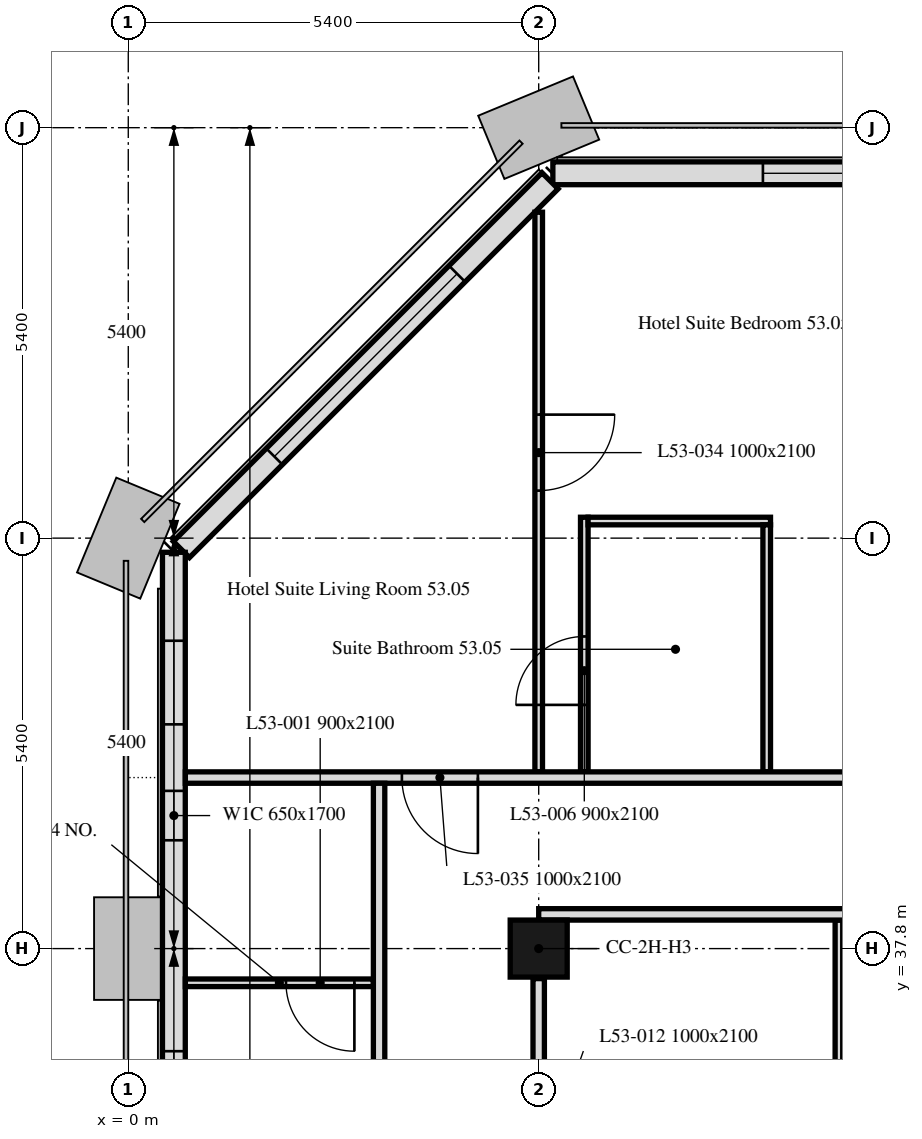
"""IFC4 building model, lengths in metres.
Left out: names, types, materials, properties, quantities, classifications, styles, units other than length and angle.
Written with IfcOpenShell. Run it as: python <this file> out.ifc"""

import sys

from ifc_helpers import new_model, si_unit, direction, frame, frame_2d, origin, origin_2d, place, context, subcontext, project, spatial, rectangle, extrude, element, fill, save


model = new_model("IFC4")
c1 = context("Model", 3, precision=1e-05, world=origin(), true_north=direction((0.0, 1.0)))
c2 = subcontext(c1, "Body", "Model", "MODEL_VIEW")
j1 = project(units=[si_unit("LENGTHUNIT", "METRE"), si_unit("PLANEANGLEUNIT", "RADIAN")], contexts=[c1])
p1 = place(None, origin())
s1 = spatial("IfcSite", under=j1, at=p1, CompositionType="ELEMENT")
p2 = place(p1, origin())
s2 = spatial("IfcBuilding", under=s1, at=p2, CompositionType="ELEMENT")
p3 = place(p2, frame((0.0, 0.0, 213.7)))
s3 = spatial("IfcBuildingStorey", under=s2, at=p3, CompositionType="ELEMENT", Elevation=213.7)
p4 = place(p3, frame((5.4, 37.8, 0.0), z_axis=(0.0, 0.0, 1.0), x_axis=(1.0, 0.0, 0.0)))
e1 = element("IfcColumn", 1, at=p4, inside=s3, PredefinedType="COLUMN", context=c2, shape_type="SweptSolid", body=[
    extrude(rectangle(XDim=0.75, YDim=0.75, at=origin_2d()), origin(), (0.0, 0.0, 1.0), 3.0),
])
p5 = place(p3, frame((37.614, 48.0, 0.0), z_axis=(0.0, 0.0, 1.0), x_axis=(-1.0, 0.0, 0.0)))
e2 = element("IfcWall", 2, at=p5, inside=s3, PredefinedType="SOLIDWALL", context=c2, shape_type="SweptSolid", body=[
    extrude(rectangle(XDim=32.027, YDim=0.3, at=frame_2d((16.014, 0.0))), origin(), (0.0, 0.0, 1.0), 3.0),
])
p6 = place(p5, frame((0.814, 0.0, 0.9)))
e3 = element("IfcOpeningElement", 3, at=p6, cuts=e2, PredefinedType="OPENING", context=c2, shape_type="SweptSolid", body=[
    extrude(rectangle(XDim=3.4, YDim=1.7, at=frame_2d((1.7, 0.85))), frame((0.0, 0.16, 0.0), z_axis=(0.0, -1.0, 0.0), x_axis=(1.0, 0.0, 0.0)), (0.0, 0.0, 1.0), 0.32),
])
p7 = place(p5, frame((6.564, 0.0, 0.9)))
e4 = element("IfcOpeningElement", 4, at=p7, cuts=e2, PredefinedType="OPENING", context=c2, shape_type="SweptSolid", body=[
    extrude(rectangle(XDim=1.1, YDim=1.7, at=frame_2d((0.55, 0.85))), frame((0.0, 0.16, 0.0), z_axis=(0.0, -1.0, 0.0), x_axis=(1.0, 0.0, 0.0)), (0.0, 0.0, 1.0), 0.32),
])
p8 = place(p5, frame((11.614, 0.0, 0.9)))
e5 = element("IfcOpeningElement", 5, at=p8, cuts=e2, PredefinedType="OPENING", context=c2, shape_type="SweptSolid", body=[
    extrude(rectangle(XDim=3.4, YDim=1.7, at=frame_2d((1.7, 0.85))), frame((0.0, 0.16, 0.0), z_axis=(0.0, -1.0, 0.0), x_axis=(1.0, 0.0, 0.0)), (0.0, 0.0, 1.0), 0.32),
])
p9 = place(p5, frame((17.364, 0.0, 0.9)))
e6 = element("IfcOpeningElement", 6, at=p9, cuts=e2, PredefinedType="OPENING", context=c2, shape_type="SweptSolid", body=[
    extrude(rectangle(XDim=1.1, YDim=1.7, at=frame_2d((0.55, 0.85))), frame((0.0, 0.16, 0.0), z_axis=(0.0, -1.0, 0.0), x_axis=(1.0, 0.0, 0.0)), (0.0, 0.0, 1.0), 0.32),
])
p10 = place(p5, frame((22.414, 0.0, 0.9)))
e7 = element("IfcOpeningElement", 7, at=p10, cuts=e2, PredefinedType="OPENING", context=c2, shape_type="SweptSolid", body=[
    extrude(rectangle(XDim=3.4, YDim=1.7, at=frame_2d((1.7, 0.85))), frame((0.0, 0.16, 0.0), z_axis=(0.0, -1.0, 0.0), x_axis=(1.0, 0.0, 0.0)), (0.0, 0.0, 1.0), 0.32),
])
p11 = place(p5, frame((28.164, 0.0, 0.9)))
e8 = element("IfcOpeningElement", 8, at=p11, cuts=e2, PredefinedType="OPENING", context=c2, shape_type="SweptSolid", body=[
    extrude(rectangle(XDim=1.1, YDim=1.7, at=frame_2d((0.55, 0.85))), frame((0.0, 0.16, 0.0), z_axis=(0.0, -1.0, 0.0), x_axis=(1.0, 0.0, 0.0)), (0.0, 0.0, 1.0), 0.32),
])
p12 = place(p3, frame((5.55, 47.901, 0.0), z_axis=(0.0, 0.0, 1.0), x_axis=(-0.707106781187, -0.707106781187, 0.0)))
e9 = element("IfcWall", 9, at=p12, inside=s3, PredefinedType="SOLIDWALL", context=c2, shape_type="SweptSolid", body=[
    extrude(rectangle(XDim=6.86, YDim=0.3, at=frame_2d((3.43, 0.0))), origin(), (0.0, 0.0, 1.0), 3.0),
])
p13 = place(p12, frame((1.73, 0.0, 0.9)))
e10 = element("IfcOpeningElement", 10, at=p13, cuts=e9, PredefinedType="OPENING", context=c2, shape_type="SweptSolid", body=[
    extrude(rectangle(XDim=3.4, YDim=1.7, at=frame_2d((1.7, 0.85))), frame((0.0, 0.16, 0.0), z_axis=(0.0, -1.0, 0.0), x_axis=(1.0, 0.0, 0.0)), (0.0, 0.0, 1.0), 0.32),
])
p14 = place(p3, frame((0.6, 43.014, 0.0), z_axis=(0.0, 0.0, 1.0), x_axis=(0.0, -1.0, 0.0)))
e11 = element("IfcWall", 11, at=p14, inside=s3, PredefinedType="SOLIDWALL", context=c2, shape_type="SweptSolid", body=[
    extrude(rectangle(XDim=32.027, YDim=0.3, at=frame_2d((16.014, 0.0))), origin(), (0.0, 0.0, 1.0), 3.0),
])
p15 = place(p14, frame((1.164, 0.0, 0.9)))
e12 = element("IfcOpeningElement", 12, at=p15, cuts=e11, PredefinedType="OPENING", context=c2, shape_type="SweptSolid", body=[
    extrude(rectangle(XDim=1.1, YDim=1.7, at=frame_2d((0.55, 0.85))), frame((0.0, 0.16, 0.0), z_axis=(0.0, -1.0, 0.0), x_axis=(1.0, 0.0, 0.0)), (0.0, 0.0, 1.0), 0.32),
])
p16 = place(p14, frame((3.139, 0.0, 0.9)))
e13 = element("IfcOpeningElement", 13, at=p16, cuts=e11, PredefinedType="OPENING", context=c2, shape_type="SweptSolid", body=[
    extrude(rectangle(XDim=0.65, YDim=1.7, at=frame_2d((0.325, 0.85))), frame((0.0, 0.16, 0.0), z_axis=(0.0, -1.0, 0.0), x_axis=(1.0, 0.0, 0.0)), (0.0, 0.0, 1.0), 0.32),
])
p17 = place(p14, frame((6.564, 0.0, 0.9)))
e14 = element("IfcOpeningElement", 14, at=p17, cuts=e11, PredefinedType="OPENING", context=c2, shape_type="SweptSolid", body=[
    extrude(rectangle(XDim=1.1, YDim=1.7, at=frame_2d((0.55, 0.85))), frame((0.0, 0.16, 0.0), z_axis=(0.0, -1.0, 0.0), x_axis=(1.0, 0.0, 0.0)), (0.0, 0.0, 1.0), 0.32),
])
p18 = place(p14, frame((8.164, 0.0, 0.9)))
e15 = element("IfcOpeningElement", 15, at=p18, cuts=e11, PredefinedType="OPENING", context=c2, shape_type="SweptSolid", body=[
    extrude(rectangle(XDim=1.1, YDim=1.7, at=frame_2d((0.55, 0.85))), frame((0.0, 0.16, 0.0), z_axis=(0.0, -1.0, 0.0), x_axis=(1.0, 0.0, 0.0)), (0.0, 0.0, 1.0), 0.32),
])
p19 = place(p14, frame((11.614, 0.0, 0.9)))
e16 = element("IfcOpeningElement", 16, at=p19, cuts=e11, PredefinedType="OPENING", context=c2, shape_type="SweptSolid", body=[
    extrude(rectangle(XDim=3.4, YDim=1.7, at=frame_2d((1.7, 0.85))), frame((0.0, 0.16, 0.0), z_axis=(0.0, -1.0, 0.0), x_axis=(1.0, 0.0, 0.0)), (0.0, 0.0, 1.0), 0.32),
])
p20 = place(p14, frame((17.364, 0.0, 0.9)))
e17 = element("IfcOpeningElement", 17, at=p20, cuts=e11, PredefinedType="OPENING", context=c2, shape_type="SweptSolid", body=[
    extrude(rectangle(XDim=1.1, YDim=1.7, at=frame_2d((0.55, 0.85))), frame((0.0, 0.16, 0.0), z_axis=(0.0, -1.0, 0.0), x_axis=(1.0, 0.0, 0.0)), (0.0, 0.0, 1.0), 0.32),
])
p21 = place(p14, frame((18.964, 0.0, 0.9)))
e18 = element("IfcOpeningElement", 18, at=p21, cuts=e11, PredefinedType="OPENING", context=c2, shape_type="SweptSolid", body=[
    extrude(rectangle(XDim=1.1, YDim=1.7, at=frame_2d((0.55, 0.85))), frame((0.0, 0.16, 0.0), z_axis=(0.0, -1.0, 0.0), x_axis=(1.0, 0.0, 0.0)), (0.0, 0.0, 1.0), 0.32),
])
p22 = place(p14, frame((22.414, 0.0, 0.9)))
e19 = element("IfcOpeningElement", 19, at=p22, cuts=e11, PredefinedType="OPENING", context=c2, shape_type="SweptSolid", body=[
    extrude(rectangle(XDim=3.4, YDim=1.7, at=frame_2d((1.7, 0.85))), frame((0.0, 0.16, 0.0), z_axis=(0.0, -1.0, 0.0), x_axis=(1.0, 0.0, 0.0)), (0.0, 0.0, 1.0), 0.32),
])
p23 = place(p14, frame((28.164, 0.0, 0.9)))
e20 = element("IfcOpeningElement", 20, at=p23, cuts=e11, PredefinedType="OPENING", context=c2, shape_type="SweptSolid", body=[
    extrude(rectangle(XDim=1.1, YDim=1.7, at=frame_2d((0.55, 0.85))), frame((0.0, 0.16, 0.0), z_axis=(0.0, -1.0, 0.0), x_axis=(1.0, 0.0, 0.0)), (0.0, 0.0, 1.0), 0.32),
])
p24 = place(p14, frame((29.764, 0.0, 0.9)))
e21 = element("IfcOpeningElement", 21, at=p24, cuts=e11, PredefinedType="OPENING", context=c2, shape_type="SweptSolid", body=[
    extrude(rectangle(XDim=1.1, YDim=1.7, at=frame_2d((0.55, 0.85))), frame((0.0, 0.16, 0.0), z_axis=(0.0, -1.0, 0.0), x_axis=(1.0, 0.0, 0.0)), (0.0, 0.0, 1.0), 0.32),
])
p25 = place(p3, frame((3.225, 37.35, 0.0), z_axis=(0.0, 0.0, 1.0), x_axis=(-1.0, 0.0, 0.0)))
e22 = element("IfcWall", 22, at=p25, inside=s3, PredefinedType="PARTITIONING", context=c2, shape_type="SweptSolid", body=[
    extrude(rectangle(XDim=2.474, YDim=0.1, at=frame_2d((1.237, 0.0))), origin(), (0.0, 0.0, 1.0), 3.0),
])
p26 = place(p25, frame((0.25, 0.0, 0.0)))
e23 = element("IfcOpeningElement", 23, at=p26, cuts=e22, PredefinedType="OPENING", context=c2, shape_type="SweptSolid", body=[
    extrude(rectangle(XDim=0.9, YDim=2.1, at=frame_2d((0.45, 1.05))), frame((0.0, 0.05, 0.0), z_axis=(0.0, -1.0, 0.0), x_axis=(1.0, 0.0, 0.0)), (0.0, 0.0, 1.0), 0.1),
])
p27 = place(p3, frame((5.4, 47.488, 0.0), z_axis=(0.0, 0.0, 1.0), x_axis=(0.0, -1.0, 0.0)))
e24 = element("IfcWall", 24, at=p27, inside=s3, PredefinedType="PARTITIONING", context=c2, shape_type="SweptSolid", body=[
    extrude(rectangle(XDim=7.363, YDim=0.1, at=frame_2d((3.681, 0.0))), origin(), (0.0, 0.0, 1.0), 3.0),
])
p28 = place(p27, frame((2.663, 0.0, 0.0)))
e25 = element("IfcOpeningElement", 25, at=p28, cuts=e24, PredefinedType="OPENING", context=c2, shape_type="SweptSolid", body=[
    extrude(rectangle(XDim=1.0, YDim=2.1, at=frame_2d((0.5, 1.05))), frame((0.0, 0.05, 0.0), z_axis=(0.0, -1.0, 0.0), x_axis=(1.0, 0.0, 0.0)), (0.0, 0.0, 1.0), 0.1),
])
p29 = place(p3, frame((6.0, 40.125, 0.0), z_axis=(0.0, 0.0, 1.0), x_axis=(0.0, 1.0, 0.0)))
e26 = element("IfcWall", 26, at=p29, inside=s3, PredefinedType="PARTITIONING", context=c2, shape_type="SweptSolid", body=[
    extrude(rectangle(XDim=3.35, YDim=0.1, at=frame_2d((1.675, 0.0))), origin(), (0.0, 0.0, 1.0), 3.0),
])
p30 = place(p29, frame((0.881, 0.0, 0.0)))
e27 = element("IfcOpeningElement", 27, at=p30, cuts=e26, PredefinedType="OPENING", context=c2, shape_type="SweptSolid", body=[
    extrude(rectangle(XDim=0.9, YDim=2.1, at=frame_2d((0.45, 1.05))), frame((0.0, 0.05, 0.0), z_axis=(0.0, -1.0, 0.0), x_axis=(1.0, 0.0, 0.0)), (0.0, 0.0, 1.0), 0.1),
])
p31 = place(p3, frame((6.05, 43.425, 0.0), z_axis=(0.0, 0.0, 1.0), x_axis=(1.0, 0.0, 0.0)))
e28 = element("IfcWall", 28, at=p31, inside=s3, PredefinedType="PARTITIONING", context=c2, shape_type="SweptSolid", body=[
    extrude(rectangle(XDim=2.4, YDim=0.1, at=frame_2d((1.2, 0.0))), origin(), (0.0, 0.0, 1.0), 3.0),
])
p32 = place(p3, frame((8.4, 43.375, 0.0), z_axis=(0.0, 0.0, 1.0), x_axis=(0.0, -1.0, 0.0)))
e29 = element("IfcWall", 29, at=p32, inside=s3, PredefinedType="PARTITIONING", context=c2, shape_type="SweptSolid", body=[
    extrude(rectangle(XDim=3.25, YDim=0.1, at=frame_2d((1.625, 0.0))), origin(), (0.0, 0.0, 1.0), 3.0),
])
p33 = place(p3, frame((42.449, 40.05, 0.0), z_axis=(0.0, 0.0, 1.0), x_axis=(-1.0, 0.0, 0.0)))
e30 = element("IfcWall", 30, at=p33, inside=s3, PredefinedType="PARTITIONING", context=c2, shape_type="SweptSolid", body=[
    extrude(rectangle(XDim=41.698, YDim=0.15, at=frame_2d((20.849, 0.0))), origin(), (0.0, 0.0, 1.0), 2.4),
])
p34 = place(p33, frame((2.249, 0.0, 0.0)))
e31 = element("IfcOpeningElement", 31, at=p34, cuts=e30, PredefinedType="OPENING", context=c2, shape_type="SweptSolid", body=[
    extrude(rectangle(XDim=1.0, YDim=2.1, at=frame_2d((0.5, 1.05))), frame((0.0, 0.075, 0.0), z_axis=(0.0, -1.0, 0.0), x_axis=(1.0, 0.0, 0.0)), (0.0, 0.0, 1.0), 0.15),
])
p35 = place(p33, frame((6.849, 0.0, 0.0)))
e32 = element("IfcOpeningElement", 32, at=p35, cuts=e30, PredefinedType="OPENING", context=c2, shape_type="SweptSolid", body=[
    extrude(rectangle(XDim=1.0, YDim=2.1, at=frame_2d((0.5, 1.05))), frame((0.0, 0.075, 0.0), z_axis=(0.0, -1.0, 0.0), x_axis=(1.0, 0.0, 0.0)), (0.0, 0.0, 1.0), 0.15),
])
p36 = place(p33, frame((18.449, 0.0, 0.0)))
e33 = element("IfcOpeningElement", 33, at=p36, cuts=e30, PredefinedType="OPENING", context=c2, shape_type="SweptSolid", body=[
    extrude(rectangle(XDim=1.0, YDim=2.1, at=frame_2d((0.5, 1.05))), frame((0.0, 0.075, 0.0), z_axis=(0.0, -1.0, 0.0), x_axis=(1.0, 0.0, 0.0)), (0.0, 0.0, 1.0), 0.15),
])
p37 = place(p33, frame((23.049, 0.0, 0.0)))
e34 = element("IfcOpeningElement", 34, at=p37, cuts=e30, PredefinedType="OPENING", context=c2, shape_type="SweptSolid", body=[
    extrude(rectangle(XDim=1.0, YDim=2.1, at=frame_2d((0.5, 1.05))), frame((0.0, 0.075, 0.0), z_axis=(0.0, -1.0, 0.0), x_axis=(1.0, 0.0, 0.0)), (0.0, 0.0, 1.0), 0.15),
])
p38 = place(p33, frame((37.849, 0.0, 0.0)))
e35 = element("IfcOpeningElement", 35, at=p38, cuts=e30, PredefinedType="OPENING", context=c2, shape_type="SweptSolid", body=[
    extrude(rectangle(XDim=1.0, YDim=2.1, at=frame_2d((0.5, 1.05))), frame((0.0, 0.075, 0.0), z_axis=(0.0, -1.0, 0.0), x_axis=(1.0, 0.0, 0.0)), (0.0, 0.0, 1.0), 0.15),
])
p39 = place(p3, frame((9.35, 38.175, 0.0), z_axis=(0.0, 0.0, 1.0), x_axis=(0.0, -1.0, 0.0)))
e36 = element("IfcWall", 36, at=p39, inside=s3, PredefinedType="PARTITIONING", context=c2, shape_type="SweptSolid", body=[
    extrude(rectangle(XDim=5.775, YDim=0.1, at=frame_2d((2.888, 0.0))), origin(), (0.0, 0.0, 1.0), 2.4),
])
p40 = place(p3, frame((5.4, 32.4, 0.0), z_axis=(0.0, 0.0, 1.0), x_axis=(0.0, 1.0, 0.0)))
e37 = element("IfcWall", 37, at=p40, inside=s3, PredefinedType="PARTITIONING", context=c2, shape_type="SweptSolid", body=[
    extrude(rectangle(XDim=5.005, YDim=0.15, at=frame_2d((2.502, 0.0))), origin(), (0.0, 0.0, 1.0), 3.0),
])
p41 = place(p40, frame((1.894, 0.0, 0.0)))
e38 = element("IfcOpeningElement", 38, at=p41, cuts=e37, PredefinedType="OPENING", context=c2, shape_type="SweptSolid", body=[
    extrude(rectangle(XDim=1.0, YDim=2.1, at=frame_2d((0.5, 1.05))), frame((0.0, 0.075, 0.0), z_axis=(0.0, -1.0, 0.0), x_axis=(1.0, 0.0, 0.0)), (0.0, 0.0, 1.0), 0.15),
])
p42 = place(p3, frame((42.449, 38.25, 0.0), z_axis=(0.0, 0.0, 1.0), x_axis=(-1.0, 0.0, 0.0)))
e39 = element("IfcWall", 39, at=p42, inside=s3, PredefinedType="PARTITIONING", context=c2, shape_type="SweptSolid", body=[
    extrude(rectangle(XDim=37.049, YDim=0.15, at=frame_2d((18.524, 0.0))), origin(), (0.0, 0.0, 1.0), 2.4),
])
p43 = place(p42, frame((12.266, 0.0, 0.0)))
e40 = element("IfcOpeningElement", 40, at=p43, cuts=e39, PredefinedType="OPENING", context=c2, shape_type="SweptSolid", body=[
    extrude(rectangle(XDim=1.0, YDim=2.1, at=frame_2d((0.5, 1.05))), frame((0.0, 0.075, 0.0), z_axis=(0.0, -1.0, 0.0), x_axis=(1.0, 0.0, 0.0)), (0.0, 0.0, 1.0), 0.15),
])
p44 = place(p42, frame((23.049, 0.0, 0.0)))
e41 = element("IfcOpeningElement", 41, at=p44, cuts=e39, PredefinedType="OPENING", context=c2, shape_type="SweptSolid", body=[
    extrude(rectangle(XDim=1.0, YDim=2.1, at=frame_2d((0.5, 1.05))), frame((0.0, 0.075, 0.0), z_axis=(0.0, -1.0, 0.0), x_axis=(1.0, 0.0, 0.0)), (0.0, 0.0, 1.0), 0.15),
])
p45 = place(p42, frame((1.409, 0.0, 0.0)))
e42 = element("IfcOpeningElement", 42, at=p45, cuts=e39, PredefinedType="OPENING", context=c2, shape_type="SweptSolid", body=[
    extrude(rectangle(XDim=1.0, YDim=2.1, at=frame_2d((0.5, 1.05))), frame((0.0, 0.075, 0.0), z_axis=(0.0, -1.0, 0.0), x_axis=(1.0, 0.0, 0.0)), (0.0, 0.0, 1.0), 0.15),
])
p46 = place(p42, frame((28.199, 0.0, 0.0)))
e43 = element("IfcOpeningElement", 43, at=p46, cuts=e39, PredefinedType="OPENING", context=c2, shape_type="SweptSolid", body=[
    extrude(rectangle(XDim=1.0, YDim=2.1, at=frame_2d((0.5, 1.05))), frame((0.0, 0.075, 0.0), z_axis=(0.0, -1.0, 0.0), x_axis=(1.0, 0.0, 0.0)), (0.0, 0.0, 1.0), 0.15),
])
p47 = place(p42, frame((7.099, 0.0, 0.0)))
e44 = element("IfcOpeningElement", 44, at=p47, cuts=e39, PredefinedType="OPENING", context=c2, shape_type="SweptSolid", body=[
    extrude(rectangle(XDim=1.0, YDim=2.1, at=frame_2d((0.5, 1.05))), frame((0.0, 0.075, 0.0), z_axis=(0.0, -1.0, 0.0), x_axis=(1.0, 0.0, 0.0)), (0.0, 0.0, 1.0), 0.15),
])
p48 = place(p42, frame((5.629, 0.0, 0.0)))
e45 = element("IfcOpeningElement", 45, at=p48, cuts=e39, PredefinedType="OPENING", context=c2, shape_type="SweptSolid", body=[
    extrude(rectangle(XDim=1.0, YDim=2.1, at=frame_2d((0.5, 1.05))), frame((0.0, 0.075, 0.0), z_axis=(0.0, -1.0, 0.0), x_axis=(1.0, 0.0, 0.0)), (0.0, 0.0, 1.0), 0.15),
])
p49 = place(p42, frame((29.669, 0.0, 0.0)))
e46 = element("IfcOpeningElement", 46, at=p49, cuts=e39, PredefinedType="OPENING", context=c2, shape_type="SweptSolid", body=[
    extrude(rectangle(XDim=1.0, YDim=2.1, at=frame_2d((0.5, 1.05))), frame((0.0, 0.075, 0.0), z_axis=(0.0, -1.0, 0.0), x_axis=(1.0, 0.0, 0.0)), (0.0, 0.0, 1.0), 0.15),
])
p50 = place(p3, frame((3.3, 11.775, 0.0), z_axis=(0.0, 0.0, 1.0), x_axis=(0.0, 1.0, 0.0)))
e47 = element("IfcWall", 47, at=p50, inside=s3, PredefinedType="PARTITIONING", context=c2, shape_type="SweptSolid", body=[
    extrude(rectangle(XDim=28.2, YDim=0.15, at=frame_2d((14.1, 0.0))), origin(), (0.0, 0.0, 1.0), 2.4),
])
p51 = place(p50, frame((17.425, 0.0, 0.0)))
e48 = element("IfcOpeningElement", 48, at=p51, cuts=e47, PredefinedType="OPENING", context=c2, shape_type="SweptSolid", body=[
    extrude(rectangle(XDim=1.0, YDim=2.1, at=frame_2d((0.5, 1.05))), frame((0.0, 0.075, 0.0), z_axis=(0.0, -1.0, 0.0), x_axis=(1.0, 0.0, 0.0)), (0.0, 0.0, 1.0), 0.15),
])
p52 = place(p50, frame((1.675, 0.0, 0.0)))
e49 = element("IfcOpeningElement", 49, at=p52, cuts=e47, PredefinedType="OPENING", context=c2, shape_type="SweptSolid", body=[
    extrude(rectangle(XDim=1.0, YDim=2.1, at=frame_2d((0.5, 1.05))), frame((0.0, 0.075, 0.0), z_axis=(0.0, -1.0, 0.0), x_axis=(1.0, 0.0, 0.0)), (0.0, 0.0, 1.0), 0.15),
])
p53 = place(p50, frame((22.6, 0.0, 0.0)))
e50 = element("IfcOpeningElement", 50, at=p53, cuts=e47, PredefinedType="OPENING", context=c2, shape_type="SweptSolid", body=[
    extrude(rectangle(XDim=1.0, YDim=2.1, at=frame_2d((0.5, 1.05))), frame((0.0, 0.075, 0.0), z_axis=(0.0, -1.0, 0.0), x_axis=(1.0, 0.0, 0.0)), (0.0, 0.0, 1.0), 0.15),
])
p54 = place(p50, frame((7.975, 0.0, 0.0)))
e51 = element("IfcOpeningElement", 51, at=p54, cuts=e47, PredefinedType="OPENING", context=c2, shape_type="SweptSolid", body=[
    extrude(rectangle(XDim=1.0, YDim=2.1, at=frame_2d((0.5, 1.05))), frame((0.0, 0.075, 0.0), z_axis=(0.0, -1.0, 0.0), x_axis=(1.0, 0.0, 0.0)), (0.0, 0.0, 1.0), 0.15),
])
p55 = place(p11, origin())
e52 = element("IfcWindow", 52, at=p55, inside=s3, PartitioningType="SINGLE_PANEL", PredefinedType="WINDOW", context=c2, shape_type="SweptSolid", body=[
    extrude(rectangle(XDim=1.1, YDim=1.7, at=frame_2d((0.55, 0.85))), frame((0.0, 0.03, 0.0), z_axis=(0.0, -1.0, 0.0), x_axis=(1.0, 0.0, 0.0)), (0.0, 0.0, 1.0), 0.06),
])
fill(e8, e52)
p56 = place(p13, origin())
e53 = element("IfcWindow", 53, at=p56, inside=s3, PartitioningType="SINGLE_PANEL", PredefinedType="WINDOW", context=c2, shape_type="SweptSolid", body=[
    extrude(rectangle(XDim=3.4, YDim=1.7, at=frame_2d((1.7, 0.85))), frame((0.0, 0.03, 0.0), z_axis=(0.0, -1.0, 0.0), x_axis=(1.0, 0.0, 0.0)), (0.0, 0.0, 1.0), 0.06),
])
fill(e10, e53)
p57 = place(p15, origin())
e54 = element("IfcWindow", 54, at=p57, inside=s3, PartitioningType="SINGLE_PANEL", PredefinedType="WINDOW", context=c2, shape_type="SweptSolid", body=[
    extrude(rectangle(XDim=1.1, YDim=1.7, at=frame_2d((0.55, 0.85))), frame((0.0, 0.03, 0.0), z_axis=(0.0, -1.0, 0.0), x_axis=(1.0, 0.0, 0.0)), (0.0, 0.0, 1.0), 0.06),
])
fill(e12, e54)
p58 = place(p16, origin())
e55 = element("IfcWindow", 55, at=p58, inside=s3, PartitioningType="SINGLE_PANEL", PredefinedType="WINDOW", context=c2, shape_type="SweptSolid", body=[
    extrude(rectangle(XDim=0.65, YDim=1.7, at=frame_2d((0.325, 0.85))), frame((0.0, 0.03, 0.0), z_axis=(0.0, -1.0, 0.0), x_axis=(1.0, 0.0, 0.0)), (0.0, 0.0, 1.0), 0.06),
])
fill(e13, e55)
p59 = place(p17, origin())
e56 = element("IfcWindow", 56, at=p59, inside=s3, PartitioningType="SINGLE_PANEL", PredefinedType="WINDOW", context=c2, shape_type="SweptSolid", body=[
    extrude(rectangle(XDim=1.1, YDim=1.7, at=frame_2d((0.55, 0.85))), frame((0.0, 0.03, 0.0), z_axis=(0.0, -1.0, 0.0), x_axis=(1.0, 0.0, 0.0)), (0.0, 0.0, 1.0), 0.06),
])
fill(e14, e56)
p60 = place(p26, origin())
e57 = element("IfcDoor", 57, at=p60, inside=s3, OperationType="SINGLE_SWING_RIGHT", PredefinedType="DOOR", context=c2, shape_type="SweptSolid", body=[
    extrude(rectangle(XDim=0.9, YDim=2.1, at=frame_2d((0.45, 1.05))), frame((0.0, 0.025, 0.0), z_axis=(0.0, -1.0, 0.0), x_axis=(1.0, 0.0, 0.0)), (0.0, 0.0, 1.0), 0.05),
])
fill(e23, e57)
p61 = place(p30, origin())
e58 = element("IfcDoor", 58, at=p61, inside=s3, OperationType="SINGLE_SWING_RIGHT", PredefinedType="DOOR", context=c2, shape_type="SweptSolid", body=[
    extrude(rectangle(XDim=0.9, YDim=2.1, at=frame_2d((0.45, 1.05))), frame((0.0, 0.025, 0.0), z_axis=(0.0, -1.0, 0.0), x_axis=(1.0, 0.0, 0.0)), (0.0, 0.0, 1.0), 0.05),
])
fill(e27, e58)
p62 = place(p28, origin())
e59 = element("IfcDoor", 59, at=p62, inside=s3, OperationType="SINGLE_SWING_RIGHT", PredefinedType="DOOR", context=c2, shape_type="SweptSolid", body=[
    extrude(rectangle(XDim=1.0, YDim=2.1, at=frame_2d((0.5, 1.05))), frame((0.0, 0.025, 0.0), z_axis=(0.0, -1.0, 0.0), x_axis=(1.0, 0.0, 0.0)), (0.0, 0.0, 1.0), 0.05),
])
fill(e25, e59)
p63 = place(p38, origin())
e60 = element("IfcDoor", 60, at=p63, inside=s3, OperationType="SINGLE_SWING_LEFT", PredefinedType="DOOR", context=c2, shape_type="SweptSolid", body=[
    extrude(rectangle(XDim=1.0, YDim=2.1, at=frame_2d((0.5, 1.05))), frame((0.0, 0.025, 0.0), z_axis=(0.0, -1.0, 0.0), x_axis=(1.0, 0.0, 0.0)), (0.0, 0.0, 1.0), 0.05),
])
fill(e35, e60)
save(model, sys.argv[1])
